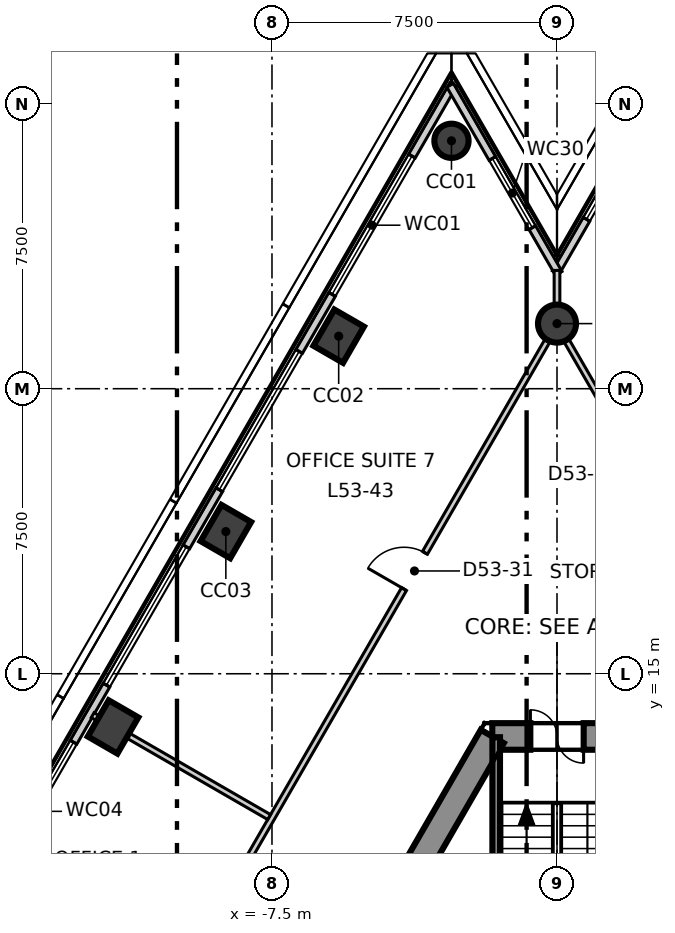
"""IFC4 building model, lengths in metres.
Left out: names, types, materials, properties, quantities, classifications, styles, units other than length and angle.
Written with IfcOpenShell. Run it as: python <this file> out.ifc"""

import sys

from ifc_helpers import new_model, si_unit, direction, frame, frame_2d, origin, origin_2d, place, context, subcontext, project, spatial, polyline, rectangle, circle, outline, extrude, element, fill, save


model = new_model("IFC4")
c1 = context("Model", 3, precision=1e-05, world=origin(), true_north=direction((0.0, 1.0)))
c2 = subcontext(c1, "Body", "Model", "MODEL_VIEW")
j1 = project(units=[si_unit("LENGTHUNIT", "METRE"), si_unit("PLANEANGLEUNIT", "RADIAN")], contexts=[c1])
p1 = place(None, origin())
s1 = spatial("IfcSite", under=j1, at=p1, CompositionType="ELEMENT")
p2 = place(p1, origin())
s2 = spatial("IfcBuilding", under=s1, at=p2, CompositionType="ELEMENT")
p3 = place(p2, frame((0.0, 0.0, 227.3)))
s3 = spatial("IfcBuildingStorey", under=s2, at=p3, CompositionType="ELEMENT", Elevation=227.3)
p4 = place(p3, frame((1.703, 13.35, -0.3), z_axis=(0.0, 0.0, 1.0), x_axis=(-1.0, 0.0, 0.0)))
e1 = element("IfcWall", 1, at=p4, inside=s3, PredefinedType="SHEAR", context=c2, shape_type="SweptSolid", body=[
    extrude(outline(polyline([(-0.202, -0.35), (1.703, -0.35), (3.608, -0.35), (3.204, 0.35), (1.703, 0.35), (0.202, 0.35), (-0.202, -0.35)])), origin(), (0.0, 0.0, 1.0), 4.0),
])
p5 = place(p4, frame((1.003, 0.0, 0.3)))
e2 = element("IfcOpeningElement", 2, at=p5, cuts=e1, PredefinedType="OPENING", context=c2, shape_type="SweptSolid", body=[
    extrude(rectangle(XDim=1.4, YDim=2.1, at=frame_2d((0.7, 1.05))), frame((0.0, 0.36, 0.0), z_axis=(0.0, -1.0, 0.0), x_axis=(1.0, 0.0, 0.0)), (0.0, 0.0, 1.0), 0.72),
])
p6 = place(p3, frame((-1.703, 13.35, -0.3), z_axis=(0.0, 0.0, 1.0), x_axis=(-0.500011533395, -0.866018744874, 0.0)))
e3 = element("IfcWall", 3, at=p6, inside=s3, PredefinedType="SHEAR", context=c2, shape_type="SweptSolid", body=[
    extrude(outline(polyline([(-0.202, -0.35), (1.782, -0.35), (3.766, -0.35), (5.75, -0.35), (7.734, -0.35), (9.718, -0.35), (11.702, -0.35), (13.686, -0.35), (15.67, -0.35), (17.654, -0.35), (19.638, -0.35), (21.622, -0.35), (21.218, 0.35), (19.307, 0.35), (17.397, 0.35), (15.486, 0.35), (13.576, 0.35), (11.665, 0.35), (9.755, 0.35), (7.844, 0.35), (5.934, 0.35), (4.023, 0.35), (2.113, 0.35), (0.202, 0.35), (-0.202, -0.35)])), origin(), (0.0, 0.0, 1.0), 4.0),
])
p7 = place(p6, frame((10.16, 0.0, 0.3)))
e4 = element("IfcOpeningElement", 4, at=p7, cuts=e3, PredefinedType="OPENING", context=c2, shape_type="SweptSolid", body=[
    extrude(rectangle(XDim=1.1, YDim=2.1, at=frame_2d((0.55, 1.05))), frame((0.0, 0.36, 0.0), z_axis=(0.0, -1.0, 0.0), x_axis=(1.0, 0.0, 0.0)), (0.0, 0.0, 1.0), 0.72),
])
p8 = place(p6, frame((16.465, 0.0, 0.3)))
e5 = element("IfcOpeningElement", 5, at=p8, cuts=e3, PredefinedType="OPENING", context=c2, shape_type="SweptSolid", body=[
    extrude(rectangle(XDim=0.9, YDim=2.1, at=frame_2d((0.45, 1.05))), frame((0.0, 0.36, 0.0), z_axis=(0.0, -1.0, 0.0), x_axis=(1.0, 0.0, 0.0)), (0.0, 0.0, 1.0), 0.72),
])
p9 = place(p6, frame((4.055, 0.0, 0.3)))
e6 = element("IfcOpeningElement", 6, at=p9, cuts=e3, PredefinedType="OPENING", context=c2, shape_type="SweptSolid", body=[
    extrude(rectangle(XDim=0.9, YDim=2.1, at=frame_2d((0.45, 1.05))), frame((0.0, 0.36, 0.0), z_axis=(0.0, -1.0, 0.0), x_axis=(1.0, 0.0, 0.0)), (0.0, 0.0, 1.0), 0.72),
])
p10 = place(p3, frame((-2.777, 29.023, -0.3), z_axis=(0.0, 0.0, 1.0), x_axis=(0.5, 0.866025403784, 0.0)))
e7 = element("IfcColumn", 7, at=p10, inside=s3, PredefinedType="COLUMN", context=c2, shape_type="SweptSolid", body=[
    extrude(circle(Radius=0.45, at=origin_2d()), origin(), (0.0, 0.0, 1.0), 4.0),
])
for number, where, z_axis, x_axis in (
    (8, (-5.745, 23.882, -0.3), (0.0, 0.0, 1.0), (0.5, 0.866, 0.0)),
    (9, (-8.714, 18.741, -0.3), (0.0, 0.0, 1.0), (0.5, 0.866, 0.0)),
    (10, (-11.682, 13.6, -0.3), (0.0, 0.0, 1.0), (0.5, 0.866, 0.0)),
):
    element("IfcColumn", number, at=place(p3, frame(where, z_axis=z_axis, x_axis=x_axis)), inside=s3, PredefinedType="COLUMN", context=c2, shape_type="SweptSolid", body=[
        extrude(rectangle(XDim=1.1, YDim=0.9, at=origin_2d()), origin(), (0.0, 0.0, 1.0), 4.0),
    ])
p11 = place(p3, frame((0.0, 24.213, -0.3), z_axis=(0.0, 0.0, 1.0), x_axis=(1.0, 0.0, 0.0)))
e11 = element("IfcColumn", 11, at=p11, inside=s3, PredefinedType="COLUMN", context=c2, shape_type="SweptSolid", body=[
    extrude(circle(Radius=0.5, at=origin_2d()), origin(), (0.0, 0.0, 1.0), 4.0),
])
p12 = place(p3, frame((-2.732, 30.501, 0.0), z_axis=(0.0, 0.0, 1.0), x_axis=(-0.500023345841, -0.866011924637, 0.0)))
e12 = element("IfcWall", 12, at=p12, inside=s3, PredefinedType="ELEMENTEDWALL", context=c2, shape_type="SweptSolid", body=[
    extrude(rectangle(XDim=50.078, YDim=0.2, at=frame_2d((25.039, 0.0))), origin(), (0.0, 0.0, 1.0), 3.7),
])
p13 = place(p12, frame((2.171, 0.0, 0.9)))
e13 = element("IfcOpeningElement", 13, at=p13, cuts=e12, PredefinedType="OPENING", context=c2, shape_type="SweptSolid", body=[
    extrude(rectangle(XDim=4.2, YDim=2.5, at=frame_2d((2.1, 1.25))), frame((0.0, 0.11, 0.0), z_axis=(0.0, -1.0, 0.0), x_axis=(1.0, 0.0, 0.0)), (0.0, 0.0, 1.0), 0.22),
])
p14 = place(p12, frame((8.107, 0.0, 0.9)))
e14 = element("IfcOpeningElement", 14, at=p14, cuts=e12, PredefinedType="OPENING", context=c2, shape_type="SweptSolid", body=[
    extrude(rectangle(XDim=4.2, YDim=2.5, at=frame_2d((2.1, 1.25))), frame((0.0, 0.11, 0.0), z_axis=(0.0, -1.0, 0.0), x_axis=(1.0, 0.0, 0.0)), (0.0, 0.0, 1.0), 0.22),
])
p15 = place(p12, frame((14.044, 0.0, 0.9)))
e15 = element("IfcOpeningElement", 15, at=p15, cuts=e12, PredefinedType="OPENING", context=c2, shape_type="SweptSolid", body=[
    extrude(rectangle(XDim=4.2, YDim=2.5, at=frame_2d((2.1, 1.25))), frame((0.0, 0.11, 0.0), z_axis=(0.0, -1.0, 0.0), x_axis=(1.0, 0.0, 0.0)), (0.0, 0.0, 1.0), 0.22),
])
p16 = place(p12, frame((19.98, 0.0, 0.9)))
e16 = element("IfcOpeningElement", 16, at=p16, cuts=e12, PredefinedType="OPENING", context=c2, shape_type="SweptSolid", body=[
    extrude(rectangle(XDim=4.2, YDim=2.5, at=frame_2d((2.1, 1.25))), frame((0.0, 0.11, 0.0), z_axis=(0.0, -1.0, 0.0), x_axis=(1.0, 0.0, 0.0)), (0.0, 0.0, 1.0), 0.22),
])
p17 = place(p12, frame((25.917, 0.0, 0.9)))
e17 = element("IfcOpeningElement", 17, at=p17, cuts=e12, PredefinedType="OPENING", context=c2, shape_type="SweptSolid", body=[
    extrude(rectangle(XDim=4.2, YDim=2.5, at=frame_2d((2.1, 1.25))), frame((0.0, 0.11, 0.0), z_axis=(0.0, -1.0, 0.0), x_axis=(1.0, 0.0, 0.0)), (0.0, 0.0, 1.0), 0.22),
])
p18 = place(p12, frame((31.853, 0.0, 0.9)))
e18 = element("IfcOpeningElement", 18, at=p18, cuts=e12, PredefinedType="OPENING", context=c2, shape_type="SweptSolid", body=[
    extrude(rectangle(XDim=4.2, YDim=2.5, at=frame_2d((2.1, 1.25))), frame((0.0, 0.11, 0.0), z_axis=(0.0, -1.0, 0.0), x_axis=(1.0, 0.0, 0.0)), (0.0, 0.0, 1.0), 0.22),
])
p19 = place(p12, frame((37.79, 0.0, 0.9)))
e19 = element("IfcOpeningElement", 19, at=p19, cuts=e12, PredefinedType="OPENING", context=c2, shape_type="SweptSolid", body=[
    extrude(rectangle(XDim=4.2, YDim=2.5, at=frame_2d((2.1, 1.25))), frame((0.0, 0.11, 0.0), z_axis=(0.0, -1.0, 0.0), x_axis=(1.0, 0.0, 0.0)), (0.0, 0.0, 1.0), 0.22),
])
p20 = place(p12, frame((43.726, 0.0, 0.9)))
e20 = element("IfcOpeningElement", 20, at=p20, cuts=e12, PredefinedType="OPENING", context=c2, shape_type="SweptSolid", body=[
    extrude(rectangle(XDim=4.2, YDim=2.5, at=frame_2d((2.1, 1.25))), frame((0.0, 0.11, 0.0), z_axis=(0.0, -1.0, 0.0), x_axis=(1.0, 0.0, 0.0)), (0.0, 0.0, 1.0), 0.22),
])
p21 = place(p3, frame((2.822, 30.501, 0.0), z_axis=(0.0, 0.0, 1.0), x_axis=(-0.49995298266, -0.866052547557, 0.0)))
e21 = element("IfcWall", 21, at=p21, inside=s3, PredefinedType="ELEMENTEDWALL", context=c2, shape_type="SweptSolid", body=[
    extrude(rectangle(XDim=5.714, YDim=0.2, at=frame_2d((2.857, 0.0))), origin(), (0.0, 0.0, 1.0), 3.7),
])
p22 = place(p21, frame((1.99, 0.0, 0.9)))
e22 = element("IfcOpeningElement", 22, at=p22, cuts=e21, PredefinedType="OPENING", context=c2, shape_type="SweptSolid", body=[
    extrude(rectangle(XDim=2.1, YDim=2.5, at=frame_2d((1.05, 1.25))), frame((0.0, 0.11, 0.0), z_axis=(0.0, -1.0, 0.0), x_axis=(1.0, 0.0, 0.0)), (0.0, 0.0, 1.0), 0.22),
])
p23 = place(p3, frame((0.045, 25.535, 0.0), z_axis=(0.0, 0.0, 1.0), x_axis=(-0.49995298266, 0.866052547557, 0.0)))
e23 = element("IfcWall", 23, at=p23, inside=s3, PredefinedType="ELEMENTEDWALL", context=c2, shape_type="SweptSolid", body=[
    extrude(rectangle(XDim=5.714, YDim=0.2, at=frame_2d((2.857, 0.0))), origin(), (0.0, 0.0, 1.0), 3.7),
])
p24 = place(p23, frame((1.39, 0.0, 0.9)))
e24 = element("IfcOpeningElement", 24, at=p24, cuts=e23, PredefinedType="OPENING", context=c2, shape_type="SweptSolid", body=[
    extrude(rectangle(XDim=2.1, YDim=2.5, at=frame_2d((1.05, 1.25))), frame((0.0, 0.11, 0.0), z_axis=(0.0, -1.0, 0.0), x_axis=(1.0, 0.0, 0.0)), (0.0, 0.0, 1.0), 0.22),
])
p25 = place(p3, frame((-20.882, -11.969, 0.0), z_axis=(0.0, 0.0, 1.0), x_axis=(0.499998738735, 0.866026131975, 0.0)))
e25 = element("IfcWall", 25, at=p25, inside=s3, PredefinedType="PARTITIONING", context=c2, shape_type="SweptSolid", body=[
    extrude(rectangle(XDim=41.764, YDim=0.15, at=frame_2d((20.882, 0.0))), origin(), (0.0, 0.0, 1.0), 3.7),
])
p26 = place(p25, frame((33.714, 0.0, 0.0)))
e26 = element("IfcOpeningElement", 26, at=p26, cuts=e25, PredefinedType="OPENING", context=c2, shape_type="SweptSolid", body=[
    extrude(rectangle(XDim=1.1, YDim=2.1, at=frame_2d((0.55, 1.05))), frame((0.0, 0.085, 0.0), z_axis=(0.0, -1.0, 0.0), x_axis=(1.0, 0.0, 0.0)), (0.0, 0.0, 1.0), 0.17),
])
p27 = place(p25, frame((23.293, 0.0, 0.0)))
e27 = element("IfcOpeningElement", 27, at=p27, cuts=e25, PredefinedType="OPENING", context=c2, shape_type="SweptSolid", body=[
    extrude(rectangle(XDim=1.0, YDim=2.1, at=frame_2d((0.5, 1.05))), frame((0.0, 0.085, 0.0), z_axis=(0.0, -1.0, 0.0), x_axis=(1.0, 0.0, 0.0)), (0.0, 0.0, 1.0), 0.17),
])
p28 = place(p25, frame((13.356, 0.0, 0.0)))
e28 = element("IfcOpeningElement", 28, at=p28, cuts=e25, PredefinedType="OPENING", context=c2, shape_type="SweptSolid", body=[
    extrude(rectangle(XDim=1.1, YDim=2.1, at=frame_2d((0.55, 1.05))), frame((0.0, 0.085, 0.0), z_axis=(0.0, -1.0, 0.0), x_axis=(1.0, 0.0, 0.0)), (0.0, 0.0, 1.0), 0.17),
])
p29 = place(p25, frame((18.556, 0.0, 0.0)))
e29 = element("IfcOpeningElement", 29, at=p29, cuts=e25, PredefinedType="OPENING", context=c2, shape_type="SweptSolid", body=[
    extrude(rectangle(XDim=0.9, YDim=2.1, at=frame_2d((0.45, 1.05))), frame((0.0, 0.085, 0.0), z_axis=(0.0, -1.0, 0.0), x_axis=(1.0, 0.0, 0.0)), (0.0, 0.0, 1.0), 0.17),
])
p30 = place(p25, frame((15.556, 0.0, 0.0)))
e30 = element("IfcOpeningElement", 30, at=p30, cuts=e25, PredefinedType="OPENING", context=c2, shape_type="SweptSolid", body=[
    extrude(rectangle(XDim=0.9, YDim=2.1, at=frame_2d((0.45, 1.05))), frame((0.0, 0.085, 0.0), z_axis=(0.0, -1.0, 0.0), x_axis=(1.0, 0.0, 0.0)), (0.0, 0.0, 1.0), 0.17),
])
p31 = place(p25, frame((3.883, 0.0, 0.0)))
e31 = element("IfcOpeningElement", 31, at=p31, cuts=e25, PredefinedType="OPENING", context=c2, shape_type="SweptSolid", body=[
    extrude(rectangle(XDim=1.1, YDim=2.1, at=frame_2d((0.55, 1.05))), frame((0.0, 0.085, 0.0), z_axis=(0.0, -1.0, 0.0), x_axis=(1.0, 0.0, 0.0)), (0.0, 0.0, 1.0), 0.17),
])
p32 = place(p3, frame((-12.219, 13.91, 0.0), z_axis=(0.0, 0.0, 1.0), x_axis=(0.866052151752, -0.499953668299, 0.0)))
e32 = element("IfcWall", 32, at=p32, inside=s3, PredefinedType="PARTITIONING", context=c2, shape_type="SweptSolid", body=[
    extrude(rectangle(XDim=5.362, YDim=0.15, at=frame_2d((2.681, 0.0))), origin(), (0.0, 0.0, 1.0), 3.7),
])
p33 = place(p3, frame((0.0, 24.35, 0.0), z_axis=(0.0, 0.0, 1.0), x_axis=(0.0, 1.0, 0.0)))
e33 = element("IfcWall", 33, at=p33, inside=s3, PredefinedType="PARTITIONING", context=c2, shape_type="SweptSolid", body=[
    extrude(rectangle(XDim=1.263, YDim=0.15, at=frame_2d((0.631, 0.0))), origin(), (0.0, 0.0, 1.0), 3.7),
])
p34 = place(p3, frame((0.075, 24.07, 0.0), z_axis=(0.0, 0.0, 1.0), x_axis=(0.49999939571, -0.866025752671, 0.0)))
e34 = element("IfcWall", 34, at=p34, inside=s3, PredefinedType="PARTITIONING", context=c2, shape_type="SweptSolid", body=[
    extrude(rectangle(XDim=41.614, YDim=0.15, at=frame_2d((20.807, 0.0))), origin(), (0.0, 0.0, 1.0), 3.7),
])
p35 = place(p34, frame((36.714, 0.0, 0.0)))
e35 = element("IfcOpeningElement", 35, at=p35, cuts=e34, PredefinedType="OPENING", context=c2, shape_type="SweptSolid", body=[
    extrude(rectangle(XDim=1.1, YDim=2.1, at=frame_2d((0.55, 1.05))), frame((0.0, 0.085, 0.0), z_axis=(0.0, -1.0, 0.0), x_axis=(1.0, 0.0, 0.0)), (0.0, 0.0, 1.0), 0.17),
])
p36 = place(p34, frame((21.831, 0.0, 0.0)))
e36 = element("IfcOpeningElement", 36, at=p36, cuts=e34, PredefinedType="OPENING", context=c2, shape_type="SweptSolid", body=[
    extrude(rectangle(XDim=1.1, YDim=2.1, at=frame_2d((0.55, 1.05))), frame((0.0, 0.085, 0.0), z_axis=(0.0, -1.0, 0.0), x_axis=(1.0, 0.0, 0.0)), (0.0, 0.0, 1.0), 0.17),
])
p37 = place(p34, frame((30.631, 0.0, 0.0)))
e37 = element("IfcOpeningElement", 37, at=p37, cuts=e34, PredefinedType="OPENING", context=c2, shape_type="SweptSolid", body=[
    extrude(rectangle(XDim=0.9, YDim=2.1, at=frame_2d((0.45, 1.05))), frame((0.0, 0.085, 0.0), z_axis=(0.0, -1.0, 0.0), x_axis=(1.0, 0.0, 0.0)), (0.0, 0.0, 1.0), 0.17),
])
p38 = place(p34, frame((27.431, 0.0, 0.0)))
e38 = element("IfcOpeningElement", 38, at=p38, cuts=e34, PredefinedType="OPENING", context=c2, shape_type="SweptSolid", body=[
    extrude(rectangle(XDim=0.9, YDim=2.1, at=frame_2d((0.45, 1.05))), frame((0.0, 0.085, 0.0), z_axis=(0.0, -1.0, 0.0), x_axis=(1.0, 0.0, 0.0)), (0.0, 0.0, 1.0), 0.17),
])
p39 = place(p34, frame((24.631, 0.0, 0.0)))
e39 = element("IfcOpeningElement", 39, at=p39, cuts=e34, PredefinedType="OPENING", context=c2, shape_type="SweptSolid", body=[
    extrude(rectangle(XDim=1.0, YDim=2.1, at=frame_2d((0.5, 1.05))), frame((0.0, 0.085, 0.0), z_axis=(0.0, -1.0, 0.0), x_axis=(1.0, 0.0, 0.0)), (0.0, 0.0, 1.0), 0.17),
])
p40 = place(p34, frame((14.358, 0.0, 0.0)))
e40 = element("IfcOpeningElement", 40, at=p40, cuts=e34, PredefinedType="OPENING", context=c2, shape_type="SweptSolid", body=[
    extrude(rectangle(XDim=1.1, YDim=2.1, at=frame_2d((0.55, 1.05))), frame((0.0, 0.085, 0.0), z_axis=(0.0, -1.0, 0.0), x_axis=(1.0, 0.0, 0.0)), (0.0, 0.0, 1.0), 0.17),
])
p41 = place(p34, frame((3.885, 0.0, 0.0)))
e41 = element("IfcOpeningElement", 41, at=p41, cuts=e34, PredefinedType="OPENING", context=c2, shape_type="SweptSolid", body=[
    extrude(rectangle(XDim=1.1, YDim=2.1, at=frame_2d((0.55, 1.05))), frame((0.0, 0.085, 0.0), z_axis=(0.0, -1.0, 0.0), x_axis=(1.0, 0.0, 0.0)), (0.0, 0.0, 1.0), 0.17),
])
p42 = place(p3, frame((-1.6, 6.615, 0.0), z_axis=(0.0, 0.0, 1.0), x_axis=(0.0, 1.0, 0.0)))
e42 = element("IfcWall", 42, at=p42, inside=s3, PredefinedType="SOLIDWALL", context=c2, shape_type="SweptSolid", body=[
    extrude(rectangle(XDim=6.715, YDim=0.2, at=frame_2d((3.357, 0.0))), origin(), (0.0, 0.0, 1.0), 3.7),
])
p43 = place(p13, origin())
e43 = element("IfcWindow", 43, at=p43, inside=s3, PartitioningType="SINGLE_PANEL", PredefinedType="WINDOW", context=c2, shape_type="SweptSolid", body=[
    extrude(rectangle(XDim=4.2, YDim=2.5, at=frame_2d((2.1, 1.25))), frame((0.0, 0.03, 0.0), z_axis=(0.0, -1.0, 0.0), x_axis=(1.0, 0.0, 0.0)), (0.0, 0.0, 1.0), 0.06),
])
fill(e13, e43)
p44 = place(p14, origin())
e44 = element("IfcWindow", 44, at=p44, inside=s3, PartitioningType="SINGLE_PANEL", PredefinedType="WINDOW", context=c2, shape_type="SweptSolid", body=[
    extrude(rectangle(XDim=4.2, YDim=2.5, at=frame_2d((2.1, 1.25))), frame((0.0, 0.03, 0.0), z_axis=(0.0, -1.0, 0.0), x_axis=(1.0, 0.0, 0.0)), (0.0, 0.0, 1.0), 0.06),
])
fill(e14, e44)
p45 = place(p15, origin())
e45 = element("IfcWindow", 45, at=p45, inside=s3, PartitioningType="SINGLE_PANEL", PredefinedType="WINDOW", context=c2, shape_type="SweptSolid", body=[
    extrude(rectangle(XDim=4.2, YDim=2.5, at=frame_2d((2.1, 1.25))), frame((0.0, 0.03, 0.0), z_axis=(0.0, -1.0, 0.0), x_axis=(1.0, 0.0, 0.0)), (0.0, 0.0, 1.0), 0.06),
])
fill(e15, e45)
p46 = place(p16, origin())
e46 = element("IfcWindow", 46, at=p46, inside=s3, PartitioningType="SINGLE_PANEL", PredefinedType="WINDOW", context=c2, shape_type="SweptSolid", body=[
    extrude(rectangle(XDim=4.2, YDim=2.5, at=frame_2d((2.1, 1.25))), frame((0.0, 0.03, 0.0), z_axis=(0.0, -1.0, 0.0), x_axis=(1.0, 0.0, 0.0)), (0.0, 0.0, 1.0), 0.06),
])
fill(e16, e46)
p47 = place(p22, origin())
e47 = element("IfcWindow", 47, at=p47, inside=s3, PartitioningType="SINGLE_PANEL", PredefinedType="WINDOW", context=c2, shape_type="SweptSolid", body=[
    extrude(rectangle(XDim=2.1, YDim=2.5, at=frame_2d((1.05, 1.25))), frame((0.0, 0.03, 0.0), z_axis=(0.0, -1.0, 0.0), x_axis=(1.0, 0.0, 0.0)), (0.0, 0.0, 1.0), 0.06),
])
fill(e22, e47)
p48 = place(p24, origin())
e48 = element("IfcWindow", 48, at=p48, inside=s3, PartitioningType="SINGLE_PANEL", PredefinedType="WINDOW", context=c2, shape_type="SweptSolid", body=[
    extrude(rectangle(XDim=2.1, YDim=2.5, at=frame_2d((1.05, 1.25))), frame((0.0, 0.03, 0.0), z_axis=(0.0, -1.0, 0.0), x_axis=(1.0, 0.0, 0.0)), (0.0, 0.0, 1.0), 0.06),
])
fill(e24, e48)
p49 = place(p26, origin())
e49 = element("IfcDoor", 49, at=p49, inside=s3, OperationType="SINGLE_SWING_RIGHT", PredefinedType="DOOR", context=c2, shape_type="SweptSolid", body=[
    extrude(rectangle(XDim=1.1, YDim=2.1, at=frame_2d((0.55, 1.05))), frame((0.0, 0.025, 0.0), z_axis=(0.0, -1.0, 0.0), x_axis=(1.0, 0.0, 0.0)), (0.0, 0.0, 1.0), 0.05),
])
fill(e26, e49)
p50 = place(p5, origin())
e50 = element("IfcDoor", 50, at=p50, inside=s3, OperationType="DOUBLE_DOOR_SINGLE_SWING", PredefinedType="DOOR", context=c2, shape_type="SweptSolid", body=[
    extrude(rectangle(XDim=1.4, YDim=2.1, at=frame_2d((0.7, 1.05))), frame((0.0, 0.025, 0.0), z_axis=(0.0, -1.0, 0.0), x_axis=(1.0, 0.0, 0.0)), (0.0, 0.0, 1.0), 0.05),
])
fill(e2, e50)
save(model, sys.argv[1])
